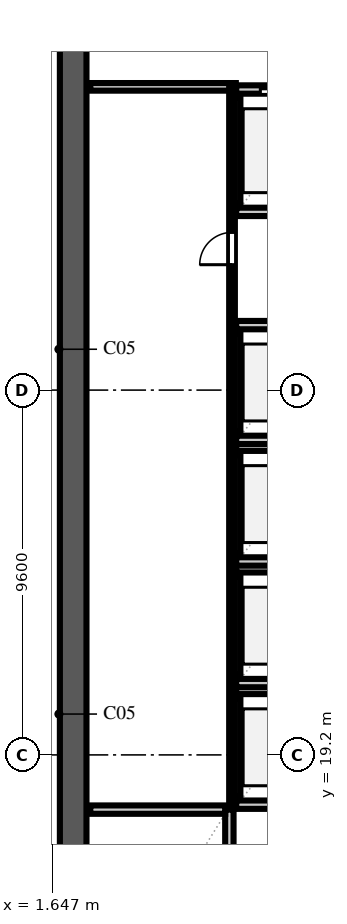
"""IFC4 building model, lengths in metres.
Left out: names, types, materials, properties, quantities, classifications, styles, units other than length and angle.
Written with IfcOpenShell. Run it as: python <this file> out.ifc"""

import sys

from ifc_helpers import new_model, si_unit, direction, frame, frame_2d, origin, place, context, subcontext, project, spatial, rectangle, extrude, element, fill, save


model = new_model("IFC4")
c1 = context("Model", 3, precision=1e-05, world=origin(), true_north=direction((0.0, 1.0)))
c2 = subcontext(c1, "Body", "Model", "MODEL_VIEW")
j1 = project(units=[si_unit("LENGTHUNIT", "METRE"), si_unit("PLANEANGLEUNIT", "RADIAN")], contexts=[c1])
p1 = place(None, origin())
s1 = spatial("IfcSite", under=j1, at=p1, CompositionType="ELEMENT")
p2 = place(p1, origin())
s2 = spatial("IfcBuilding", under=s1, at=p2, CompositionType="ELEMENT")
p3 = place(p2, frame((0.0, 0.0, 150.8)))
s3 = spatial("IfcBuildingStorey", under=s2, at=p3, CompositionType="ELEMENT", Elevation=150.8)
p4 = place(p3, frame((2.2, 9.25, 0.0), z_axis=(0.0, 0.0, 1.0), x_axis=(0.0, 1.0, 0.0)))
e1 = element("IfcWall", 1, at=p4, inside=s3, PredefinedType="SHEAR", context=c2, shape_type="SweptSolid", body=[
    extrude(rectangle(XDim=39.1, YDim=0.7, at=frame_2d((19.55, 0.0))), origin(), (0.0, 0.0, 1.0), 4.94),
])
p5 = place(p3, frame((6.31, 9.95, 0.0), z_axis=(0.0, 0.0, 1.0), x_axis=(0.0, 1.0, 0.0)))
e2 = element("IfcWall", 2, at=p5, inside=s3, PredefinedType="SOLIDWALL", context=c2, shape_type="SweptSolid", body=[
    extrude(rectangle(XDim=7.81, YDim=0.22, at=frame_2d((3.905, 0.0))), origin(), (0.0, 0.0, 1.0), 4.94),
])
p6 = place(p5, frame((0.14, 0.0, 0.0)))
e3 = element("IfcOpeningElement", 3, at=p6, cuts=e2, PredefinedType="OPENING", context=c2, shape_type="SweptSolid", body=[
    extrude(rectangle(XDim=1.1, YDim=2.2, at=frame_2d((0.55, 1.1))), frame((0.0, 0.122, 0.0), z_axis=(0.0, -1.0, 0.0), x_axis=(1.0, 0.0, 0.0)), (0.0, 0.0, 1.0), 0.244),
])
p7 = place(p3, frame((2.65, 17.76, 0.0), z_axis=(0.0, 0.0, 1.0), x_axis=(1.0, 0.0, 0.0)))
e4 = element("IfcWall", 4, at=p7, inside=s3, PredefinedType="SOLIDWALL", context=c2, shape_type="SweptSolid", body=[
    extrude(rectangle(XDim=3.55, YDim=0.22, at=frame_2d((1.775, 0.0))), origin(), (0.0, 0.0, 1.0), 4.94),
])
p8 = place(p3, frame((6.49, 18.11, 0.0), z_axis=(0.0, 0.0, 1.0), x_axis=(0.0, 1.0, 0.0)))
e5 = element("IfcWall", 5, at=p8, inside=s3, PredefinedType="SOLIDWALL", context=c2, shape_type="SweptSolid", body=[
    extrude(rectangle(XDim=2.58, YDim=0.22, at=frame_2d((1.29, 0.0))), origin(), (0.0, 0.0, 1.0), 4.94),
])
for number, where, z_axis, x_axis in (
    (6, (6.49, 17.89, 0.0), (0.0, 0.0, 1.0), (1.0, 0.0, 0.0)),
    (7, (6.49, 20.91, 0.0), (0.0, 0.0, 1.0), (1.0, 0.0, 0.0)),
):
    element("IfcWall", number, at=place(p3, frame(where, z_axis=z_axis, x_axis=x_axis)), inside=s3, PredefinedType="SOLIDWALL", context=c2, shape_type="SweptSolid", body=[
        extrude(rectangle(XDim=2.47, YDim=0.22, at=frame_2d((1.235, 0.0))), origin(), (0.0, 0.0, 1.0), 4.94),
    ])
p9 = place(p3, frame((6.49, 21.31, 0.0), z_axis=(0.0, 0.0, 1.0), x_axis=(0.0, 1.0, 0.0)))
e8 = element("IfcWall", 8, at=p9, inside=s3, PredefinedType="SOLIDWALL", context=c2, shape_type="SweptSolid", body=[
    extrude(rectangle(XDim=2.58, YDim=0.22, at=frame_2d((1.29, 0.0))), origin(), (0.0, 0.0, 1.0), 4.94),
])
for number, where, z_axis, x_axis in (
    (9, (6.49, 21.09, 0.0), (0.0, 0.0, 1.0), (1.0, 0.0, 0.0)),
    (10, (6.49, 24.11, 0.0), (0.0, 0.0, 1.0), (1.0, 0.0, 0.0)),
):
    element("IfcWall", number, at=place(p3, frame(where, z_axis=z_axis, x_axis=x_axis)), inside=s3, PredefinedType="SOLIDWALL", context=c2, shape_type="SweptSolid", body=[
        extrude(rectangle(XDim=2.47, YDim=0.22, at=frame_2d((1.235, 0.0))), origin(), (0.0, 0.0, 1.0), 4.94),
    ])
p10 = place(p3, frame((6.49, 24.51, 0.0), z_axis=(0.0, 0.0, 1.0), x_axis=(0.0, 1.0, 0.0)))
e11 = element("IfcWall", 11, at=p10, inside=s3, PredefinedType="SOLIDWALL", context=c2, shape_type="SweptSolid", body=[
    extrude(rectangle(XDim=2.58, YDim=0.22, at=frame_2d((1.29, 0.0))), origin(), (0.0, 0.0, 1.0), 4.94),
])
for number, where, z_axis, x_axis in (
    (12, (6.49, 24.29, 0.0), (0.0, 0.0, 1.0), (1.0, 0.0, 0.0)),
    (13, (6.49, 27.31, 0.0), (0.0, 0.0, 1.0), (1.0, 0.0, 0.0)),
):
    element("IfcWall", number, at=place(p3, frame(where, z_axis=z_axis, x_axis=x_axis)), inside=s3, PredefinedType="SOLIDWALL", context=c2, shape_type="SweptSolid", body=[
        extrude(rectangle(XDim=2.47, YDim=0.22, at=frame_2d((1.235, 0.0))), origin(), (0.0, 0.0, 1.0), 4.94),
    ])
p11 = place(p3, frame((6.49, 27.71, 0.0), z_axis=(0.0, 0.0, 1.0), x_axis=(0.0, 1.0, 0.0)))
e14 = element("IfcWall", 14, at=p11, inside=s3, PredefinedType="SOLIDWALL", context=c2, shape_type="SweptSolid", body=[
    extrude(rectangle(XDim=2.58, YDim=0.22, at=frame_2d((1.29, 0.0))), origin(), (0.0, 0.0, 1.0), 4.94),
])
for number, where, z_axis, x_axis in (
    (15, (6.49, 27.49, 0.0), (0.0, 0.0, 1.0), (1.0, 0.0, 0.0)),
    (16, (6.49, 30.51, 0.0), (0.0, 0.0, 1.0), (1.0, 0.0, 0.0)),
):
    element("IfcWall", number, at=place(p3, frame(where, z_axis=z_axis, x_axis=x_axis)), inside=s3, PredefinedType="SOLIDWALL", context=c2, shape_type="SweptSolid", body=[
        extrude(rectangle(XDim=2.47, YDim=0.22, at=frame_2d((1.235, 0.0))), origin(), (0.0, 0.0, 1.0), 4.94),
    ])
p12 = place(p3, frame((6.49, 33.71, 0.0), z_axis=(0.0, 0.0, 1.0), x_axis=(0.0, 1.0, 0.0)))
e17 = element("IfcWall", 17, at=p12, inside=s3, PredefinedType="SOLIDWALL", context=c2, shape_type="SweptSolid", body=[
    extrude(rectangle(XDim=2.78, YDim=0.22, at=frame_2d((1.39, 0.0))), origin(), (0.0, 0.0, 1.0), 4.94),
])
p13 = place(p3, frame((6.49, 33.49, 0.0), z_axis=(0.0, 0.0, 1.0), x_axis=(1.0, 0.0, 0.0)))
e18 = element("IfcWall", 18, at=p13, inside=s3, PredefinedType="SOLIDWALL", context=c2, shape_type="SweptSolid", body=[
    extrude(rectangle(XDim=2.47, YDim=0.22, at=frame_2d((1.235, 0.0))), origin(), (0.0, 0.0, 1.0), 4.94),
])
p14 = place(p3, frame((6.49, 36.71, 0.0), z_axis=(0.0, 0.0, 1.0), x_axis=(1.0, 0.0, 0.0)))
e19 = element("IfcWall", 19, at=p14, inside=s3, PredefinedType="SOLIDWALL", context=c2, shape_type="SweptSolid", body=[
    extrude(rectangle(XDim=2.47, YDim=0.22, at=frame_2d((1.235, 0.0))), origin(), (0.0, 0.0, 1.0), 4.94),
])
p15 = place(p14, frame((0.635, 0.0, 0.0)))
e20 = element("IfcOpeningElement", 20, at=p15, cuts=e19, PredefinedType="OPENING", context=c2, shape_type="SweptSolid", body=[
    extrude(rectangle(XDim=1.2, YDim=2.2, at=frame_2d((0.6, 1.1))), frame((0.0, 0.122, 0.0), z_axis=(0.0, -1.0, 0.0), x_axis=(1.0, 0.0, 0.0)), (0.0, 0.0, 1.0), 0.244),
])
p16 = place(p3, frame((2.65, 36.78, 0.0), z_axis=(0.0, 0.0, 1.0), x_axis=(1.0, 0.0, 0.0)))
e21 = element("IfcWall", 21, at=p16, inside=s3, PredefinedType="SOLIDWALL", context=c2, shape_type="SweptSolid", body=[
    extrude(rectangle(XDim=3.83, YDim=0.2, at=frame_2d((1.915, 0.0))), origin(), (0.0, 0.0, 1.0), 4.94),
])
p17 = place(p3, frame((6.38, 17.8, 0.0), z_axis=(0.0, 0.0, 1.0), x_axis=(0.0, 1.0, 0.0)))
e22 = element("IfcWall", 22, at=p17, inside=s3, PredefinedType="PARTITIONING", context=c2, shape_type="SweptSolid", body=[
    extrude(rectangle(XDim=18.98, YDim=0.15, at=frame_2d((9.49, 0.0))), origin(), (0.0, 0.0, 1.0), 4.94),
])
p18 = place(p17, frame((14.3, 0.0, 0.0)))
e23 = element("IfcOpeningElement", 23, at=p18, cuts=e22, PredefinedType="OPENING", context=c2, shape_type="SweptSolid", body=[
    extrude(rectangle(XDim=0.85, YDim=2.1, at=frame_2d((0.425, 1.05))), frame((0.0, 0.087, 0.0), z_axis=(0.0, -1.0, 0.0), x_axis=(1.0, 0.0, 0.0)), (0.0, 0.0, 1.0), 0.174),
])
p19 = place(p15, origin())
e24 = element("IfcDoor", 24, at=p19, inside=s3, OperationType="DOUBLE_DOOR_SLIDING", PredefinedType="DOOR", context=c2, shape_type="SweptSolid", body=[
    extrude(rectangle(XDim=1.2, YDim=2.2, at=frame_2d((0.6, 1.1))), frame((0.0, 0.025, 0.0), z_axis=(0.0, -1.0, 0.0), x_axis=(1.0, 0.0, 0.0)), (0.0, 0.0, 1.0), 0.05),
])
fill(e20, e24)
p20 = place(p18, origin())
e25 = element("IfcDoor", 25, at=p20, inside=s3, OperationType="SINGLE_SWING_LEFT", PredefinedType="DOOR", context=c2, shape_type="SweptSolid", body=[
    extrude(rectangle(XDim=0.85, YDim=2.1, at=frame_2d((0.425, 1.05))), frame((0.0, 0.025, 0.0), z_axis=(0.0, -1.0, 0.0), x_axis=(1.0, 0.0, 0.0)), (0.0, 0.0, 1.0), 0.05),
])
fill(e23, e25)
save(model, sys.argv[1])
